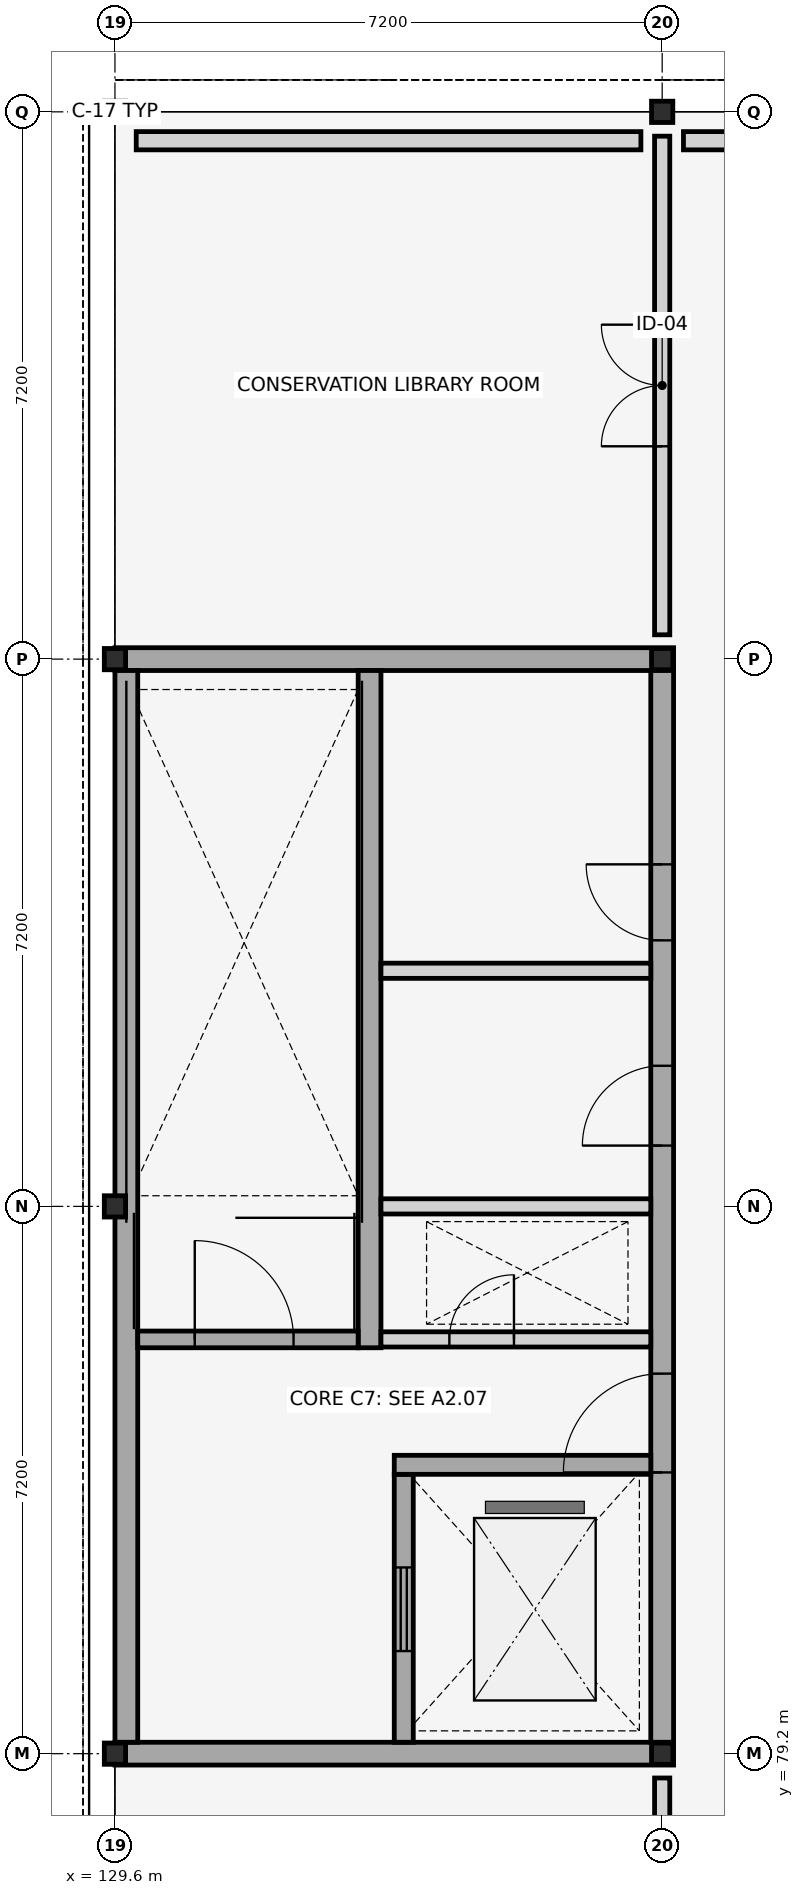
"""IFC4 building model, lengths in metres.
Left out: names, types, materials, properties, quantities, classifications, styles, units other than length and angle.
Written with IfcOpenShell. Run it as: python <this file> out.ifc"""

import sys

from ifc_helpers import new_model, si_unit, direction, frame, frame_2d, origin, origin_2d, place, context, subcontext, project, spatial, rectangle, i_section, extrude, element, fill, save


model = new_model("IFC4")
c1 = context("Model", 3, precision=1e-05, world=origin(), true_north=direction((0.0, 1.0)))
c2 = subcontext(c1, "Body", "Model", "MODEL_VIEW")
j1 = project(units=[si_unit("LENGTHUNIT", "METRE"), si_unit("PLANEANGLEUNIT", "RADIAN")], contexts=[c1])
p1 = place(None, origin())
s1 = spatial("IfcSite", under=j1, at=p1, CompositionType="ELEMENT")
p2 = place(p1, origin())
s2 = spatial("IfcBuilding", under=s1, at=p2, CompositionType="ELEMENT")
p3 = place(p2, frame((0.0, 0.0, 4.5)))
s3 = spatial("IfcBuildingStorey", under=s2, at=p3, CompositionType="ELEMENT", Elevation=4.5)
for number, where, z_axis, x_axis in (
    (1, (129.6, 79.2, 0.0), (0.0, 0.0, 1.0), (0.0, 1.0, 0.0)),
    (2, (129.6, 86.4, 0.0), (0.0, 0.0, 1.0), (1.0, 0.0, 0.0)),
    (3, (129.6, 93.6, 0.0), (0.0, 0.0, 1.0), (0.0, 1.0, 0.0)),
    (4, (129.6, 100.8, 0.0), (0.0, 0.0, 1.0), (1.0, 0.0, 0.0)),
    (5, (136.8, 79.2, 0.0), (0.0, 0.0, 1.0), (1.0, 0.0, 0.0)),
    (6, (136.8, 93.6, 0.0), (0.0, 0.0, 1.0), (1.0, 0.0, 0.0)),
    (7, (136.8, 100.8, 0.0), (0.0, 0.0, 1.0), (0.0, 1.0, 0.0)),
):
    element("IfcColumn", number, at=place(p3, frame(where, z_axis=z_axis, x_axis=x_axis)), inside=s3, PredefinedType="COLUMN", context=c2, shape_type="SweptSolid", body=[
        extrude(i_section(OverallWidth=0.28, OverallDepth=0.28, WebThickness=0.01, FlangeThickness=0.018, FilletRadius=0.024, at=origin_2d()), origin(), (0.0, 0.0, 1.0), 4.2),
    ])
p4 = place(p3, frame((143.72, 100.42, 0.0), z_axis=(0.0, 0.0, 1.0), x_axis=(-1.0, 0.0, 0.0)))
e8 = element("IfcWall", 8, at=p4, inside=s3, PredefinedType="STANDARD", context=c2, shape_type="SweptSolid", body=[
    extrude(rectangle(XDim=6.64, YDim=0.24, at=frame_2d((3.32, 0.0))), origin(), (0.0, 0.0, 1.0), 3.58),
])
p5 = place(p3, frame((136.52, 100.42, 0.0), z_axis=(0.0, 0.0, 1.0), x_axis=(-1.0, 0.0, 0.0)))
e9 = element("IfcWall", 9, at=p5, inside=s3, PredefinedType="STANDARD", context=c2, shape_type="SweptSolid", body=[
    extrude(rectangle(XDim=6.64, YDim=0.24, at=frame_2d((3.32, 0.0))), origin(), (0.0, 0.0, 1.0), 3.58),
])
for number, where, z_axis, x_axis in (
    (10, (129.6, 79.2, 0.0), (0.0, 0.0, 1.0), (1.0, 0.0, 0.0)),
    (11, (129.6, 93.6, 0.0), (0.0, 0.0, 1.0), (1.0, 0.0, 0.0)),
):
    element("IfcWall", number, at=place(p3, frame(where, z_axis=z_axis, x_axis=x_axis)), inside=s3, PredefinedType="SHEAR", context=c2, shape_type="SweptSolid", body=[
        extrude(rectangle(XDim=7.35, YDim=0.3, at=frame_2d((3.675, 0.0))), origin(), (0.0, 0.0, 1.0), 3.98),
    ])
p6 = place(p3, frame((129.75, 79.35, 0.0), z_axis=(0.0, 0.0, 1.0), x_axis=(0.0, 1.0, 0.0)))
e12 = element("IfcWall", 12, at=p6, inside=s3, PredefinedType="SHEAR", context=c2, shape_type="SweptSolid", body=[
    extrude(rectangle(XDim=14.1, YDim=0.3, at=frame_2d((7.05, 0.0))), origin(), (0.0, 0.0, 1.0), 3.98),
])
p7 = place(p3, frame((136.8, 79.35, 0.0), z_axis=(0.0, 0.0, 1.0), x_axis=(0.0, 1.0, 0.0)))
e13 = element("IfcWall", 13, at=p7, inside=s3, PredefinedType="SHEAR", context=c2, shape_type="SweptSolid", body=[
    extrude(rectangle(XDim=14.1, YDim=0.3, at=frame_2d((7.05, 0.0))), origin(), (0.0, 0.0, 1.0), 3.98),
])
p8 = place(p7, frame((3.55, 0.0, 0.0)))
e14 = element("IfcOpeningElement", 14, at=p8, cuts=e13, PredefinedType="OPENING", context=c2, shape_type="SweptSolid", body=[
    extrude(rectangle(XDim=1.3, YDim=2.2, at=frame_2d((0.65, 1.1))), frame((0.0, 0.16, 0.0), z_axis=(0.0, -1.0, 0.0), x_axis=(1.0, 0.0, 0.0)), (0.0, 0.0, 1.0), 0.32),
])
p9 = place(p7, frame((7.85, 0.0, 0.0)))
e15 = element("IfcOpeningElement", 15, at=p9, cuts=e13, PredefinedType="OPENING", context=c2, shape_type="SweptSolid", body=[
    extrude(rectangle(XDim=1.05, YDim=2.15, at=frame_2d((0.525, 1.075))), frame((0.0, 0.16, 0.0), z_axis=(0.0, -1.0, 0.0), x_axis=(1.0, 0.0, 0.0)), (0.0, 0.0, 1.0), 0.32),
])
p10 = place(p7, frame((10.55, 0.0, 0.0)))
e16 = element("IfcOpeningElement", 16, at=p10, cuts=e13, PredefinedType="OPENING", context=c2, shape_type="SweptSolid", body=[
    extrude(rectangle(XDim=1.0, YDim=2.15, at=frame_2d((0.5, 1.075))), frame((0.0, 0.16, 0.0), z_axis=(0.0, -1.0, 0.0), x_axis=(1.0, 0.0, 0.0)), (0.0, 0.0, 1.0), 0.32),
])
p11 = place(p3, frame((133.4, 79.35, 0.0), z_axis=(0.0, 0.0, 1.0), x_axis=(0.0, 1.0, 0.0)))
e17 = element("IfcWall", 17, at=p11, inside=s3, PredefinedType="SHEAR", context=c2, shape_type="SweptSolid", body=[
    extrude(rectangle(XDim=3.525, YDim=0.25, at=frame_2d((1.762, 0.0))), origin(), (0.0, 0.0, 1.0), 3.98),
])
p12 = place(p11, frame((1.2, 0.0, 0.0)))
e18 = element("IfcOpeningElement", 18, at=p12, cuts=e17, PredefinedType="OPENING", context=c2, shape_type="SweptSolid", body=[
    extrude(rectangle(XDim=1.1, YDim=2.15, at=frame_2d((0.55, 1.075))), frame((0.0, 0.135, 0.0), z_axis=(0.0, -1.0, 0.0), x_axis=(1.0, 0.0, 0.0)), (0.0, 0.0, 1.0), 0.27),
])
p13 = place(p3, frame((132.95, 84.54, 0.0), z_axis=(0.0, 0.0, 1.0), x_axis=(0.0, 1.0, 0.0)))
e19 = element("IfcWall", 19, at=p13, inside=s3, PredefinedType="SHEAR", context=c2, shape_type="SweptSolid", body=[
    extrude(rectangle(XDim=8.91, YDim=0.3, at=frame_2d((4.455, 0.0))), origin(), (0.0, 0.0, 1.0), 3.98),
])
p14 = place(p3, frame((133.1, 84.65, 0.0), z_axis=(0.0, 0.0, 1.0), x_axis=(1.0, 0.0, 0.0)))
e20 = element("IfcWall", 20, at=p14, inside=s3, PredefinedType="PLUMBINGWALL", context=c2, shape_type="SweptSolid", body=[
    extrude(rectangle(XDim=3.55, YDim=0.2, at=frame_2d((1.775, 0.0))), origin(), (0.0, 0.0, 1.0), 3.4),
])
p15 = place(p14, frame((0.9, 0.0, 0.0)))
e21 = element("IfcOpeningElement", 21, at=p15, cuts=e20, PredefinedType="OPENING", context=c2, shape_type="SweptSolid", body=[
    extrude(rectangle(XDim=0.85, YDim=2.05, at=frame_2d((0.425, 1.025))), frame((0.0, 0.11, 0.0), z_axis=(0.0, -1.0, 0.0), x_axis=(1.0, 0.0, 0.0)), (0.0, 0.0, 1.0), 0.22),
])
p16 = place(p3, frame((129.9, 84.65, 0.0), z_axis=(0.0, 0.0, 1.0), x_axis=(1.0, 0.0, 0.0)))
e22 = element("IfcWall", 22, at=p16, inside=s3, PredefinedType="SHEAR", context=c2, shape_type="SweptSolid", body=[
    extrude(rectangle(XDim=2.9, YDim=0.22, at=frame_2d((1.45, 0.0))), origin(), (0.0, 0.0, 1.0), 3.98),
])
p17 = place(p16, frame((0.75, 0.0, 0.0)))
e23 = element("IfcOpeningElement", 23, at=p17, cuts=e22, PredefinedType="OPENING", context=c2, shape_type="SweptSolid", body=[
    extrude(rectangle(XDim=1.3, YDim=2.2, at=frame_2d((0.65, 1.1))), frame((0.0, 0.12, 0.0), z_axis=(0.0, -1.0, 0.0), x_axis=(1.0, 0.0, 0.0)), (0.0, 0.0, 1.0), 0.24),
])
p18 = place(p3, frame((133.275, 83.0, 0.0), z_axis=(0.0, 0.0, 1.0), x_axis=(1.0, 0.0, 0.0)))
e24 = element("IfcWall", 24, at=p18, inside=s3, PredefinedType="SHEAR", context=c2, shape_type="SweptSolid", body=[
    extrude(rectangle(XDim=3.375, YDim=0.25, at=frame_2d((1.688, 0.0))), origin(), (0.0, 0.0, 1.0), 3.98),
])
for number, where, z_axis, x_axis in (
    (25, (133.1, 86.4, 0.0), (0.0, 0.0, 1.0), (1.0, 0.0, 0.0)),
    (26, (133.1, 89.5, 0.0), (0.0, 0.0, 1.0), (1.0, 0.0, 0.0)),
):
    element("IfcWall", number, at=place(p3, frame(where, z_axis=z_axis, x_axis=x_axis)), inside=s3, PredefinedType="PLUMBINGWALL", context=c2, shape_type="SweptSolid", body=[
        extrude(rectangle(XDim=3.55, YDim=0.2, at=frame_2d((1.775, 0.0))), origin(), (0.0, 0.0, 1.0), 3.4),
    ])
p19 = place(p3, frame((136.8, 50.72, 0.0), z_axis=(0.0, 0.0, 1.0), x_axis=(0.0, 1.0, 0.0)))
e27 = element("IfcWall", 27, at=p19, inside=s3, PredefinedType="PARTITIONING", context=c2, shape_type="SweptSolid", body=[
    extrude(rectangle(XDim=28.16, YDim=0.2, at=frame_2d((14.08, 0.0))), origin(), (0.0, 0.0, 1.0), 3.15),
])
p20 = place(p19, frame((1.699, 0.0, 0.0)))
e28 = element("IfcOpeningElement", 28, at=p20, cuts=e27, PredefinedType="OPENING", context=c2, shape_type="SweptSolid", body=[
    extrude(rectangle(XDim=1.5, YDim=2.25, at=frame_2d((0.75, 1.125))), frame((0.0, 0.11, 0.0), z_axis=(0.0, -1.0, 0.0), x_axis=(1.0, 0.0, 0.0)), (0.0, 0.0, 1.0), 0.22),
])
p21 = place(p3, frame((136.8, 93.92, 0.0), z_axis=(0.0, 0.0, 1.0), x_axis=(0.0, 1.0, 0.0)))
e29 = element("IfcWall", 29, at=p21, inside=s3, PredefinedType="PARTITIONING", context=c2, shape_type="SweptSolid", body=[
    extrude(rectangle(XDim=6.56, YDim=0.2, at=frame_2d((3.28, 0.0))), origin(), (0.0, 0.0, 1.0), 3.15),
])
p22 = place(p21, frame((2.48, 0.0, 0.0)))
e30 = element("IfcOpeningElement", 30, at=p22, cuts=e29, PredefinedType="OPENING", context=c2, shape_type="SweptSolid", body=[
    extrude(rectangle(XDim=1.6, YDim=2.35, at=frame_2d((0.8, 1.175))), frame((0.0, 0.11, 0.0), z_axis=(0.0, -1.0, 0.0), x_axis=(1.0, 0.0, 0.0)), (0.0, 0.0, 1.0), 0.22),
])
p23 = place(p8, origin())
e31 = element("IfcDoor", 31, at=p23, inside=s3, OperationType="SINGLE_SWING_LEFT", PredefinedType="DOOR", context=c2, shape_type="SweptSolid", body=[
    extrude(rectangle(XDim=1.3, YDim=2.2, at=frame_2d((0.65, 1.1))), frame((0.0, 0.025, 0.0), z_axis=(0.0, -1.0, 0.0), x_axis=(1.0, 0.0, 0.0)), (0.0, 0.0, 1.0), 0.05),
])
fill(e14, e31)
p24 = place(p9, origin())
e32 = element("IfcDoor", 32, at=p24, inside=s3, OperationType="SINGLE_SWING_LEFT", PredefinedType="DOOR", context=c2, shape_type="SweptSolid", body=[
    extrude(rectangle(XDim=1.05, YDim=2.15, at=frame_2d((0.525, 1.075))), frame((0.0, 0.025, 0.0), z_axis=(0.0, -1.0, 0.0), x_axis=(1.0, 0.0, 0.0)), (0.0, 0.0, 1.0), 0.05),
])
fill(e15, e32)
p25 = place(p10, origin())
e33 = element("IfcDoor", 33, at=p25, inside=s3, OperationType="SINGLE_SWING_RIGHT", PredefinedType="DOOR", context=c2, shape_type="SweptSolid", body=[
    extrude(rectangle(XDim=1.0, YDim=2.15, at=frame_2d((0.5, 1.075))), frame((0.0, 0.025, 0.0), z_axis=(0.0, -1.0, 0.0), x_axis=(1.0, 0.0, 0.0)), (0.0, 0.0, 1.0), 0.05),
])
fill(e16, e33)
p26 = place(p12, origin())
e34 = element("IfcDoor", 34, at=p26, inside=s3, OperationType="SLIDING_TO_LEFT", PredefinedType="DOOR", context=c2, shape_type="SweptSolid", body=[
    extrude(rectangle(XDim=1.1, YDim=2.15, at=frame_2d((0.55, 1.075))), frame((0.0, 0.025, 0.0), z_axis=(0.0, -1.0, 0.0), x_axis=(1.0, 0.0, 0.0)), (0.0, 0.0, 1.0), 0.05),
])
fill(e18, e34)
p27 = place(p15, origin())
e35 = element("IfcDoor", 35, at=p27, inside=s3, OperationType="SINGLE_SWING_RIGHT", PredefinedType="TRAPDOOR", context=c2, shape_type="SweptSolid", body=[
    extrude(rectangle(XDim=0.85, YDim=2.05, at=frame_2d((0.425, 1.025))), frame((0.0, 0.025, 0.0), z_axis=(0.0, -1.0, 0.0), x_axis=(1.0, 0.0, 0.0)), (0.0, 0.0, 1.0), 0.05),
])
fill(e21, e35)
p28 = place(p17, origin())
e36 = element("IfcDoor", 36, at=p28, inside=s3, OperationType="SINGLE_SWING_LEFT", PredefinedType="DOOR", context=c2, shape_type="SweptSolid", body=[
    extrude(rectangle(XDim=1.3, YDim=2.2, at=frame_2d((0.65, 1.1))), frame((0.0, 0.025, 0.0), z_axis=(0.0, -1.0, 0.0), x_axis=(1.0, 0.0, 0.0)), (0.0, 0.0, 1.0), 0.05),
])
fill(e23, e36)
p29 = place(p22, origin())
e37 = element("IfcDoor", 37, at=p29, inside=s3, OperationType="DOUBLE_DOOR_SINGLE_SWING", PredefinedType="DOOR", context=c2, shape_type="SweptSolid", body=[
    extrude(rectangle(XDim=1.6, YDim=2.35, at=frame_2d((0.8, 1.175))), frame((0.0, 0.025, 0.0), z_axis=(0.0, -1.0, 0.0), x_axis=(1.0, 0.0, 0.0)), (0.0, 0.0, 1.0), 0.05),
])
fill(e30, e37)
save(model, sys.argv[1])
